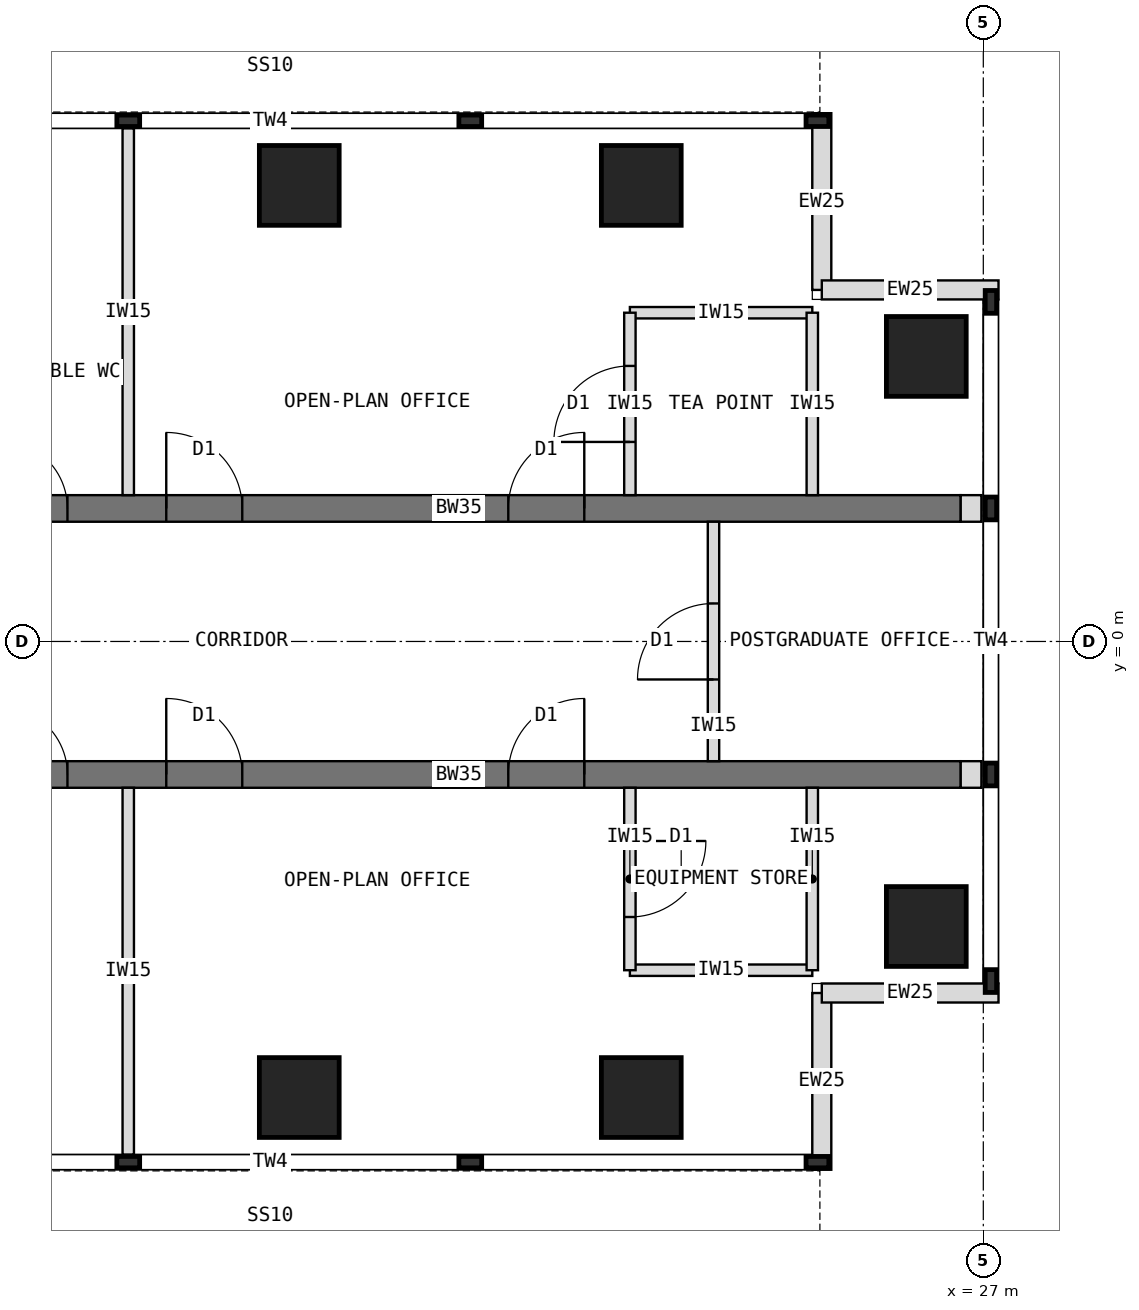
"""IFC4 building model, lengths in metres.
Left out: names, types, materials, properties, quantities, classifications, styles, units other than length and angle.
Written with IfcOpenShell. Run it as: python <this file> out.ifc"""

import sys

from ifc_helpers import new_model, si_unit, direction, frame, frame_2d, origin, origin_2d, place, context, subcontext, project, spatial, rectangle, extrude, element, fill, save


model = new_model("IFC4")
c1 = context("Model", 3, precision=1e-05, world=origin(), true_north=direction((0.0, 1.0)))
c2 = subcontext(c1, "Body", "Model", "MODEL_VIEW")
j1 = project(units=[si_unit("LENGTHUNIT", "METRE"), si_unit("PLANEANGLEUNIT", "RADIAN")], contexts=[c1])
p1 = place(None, origin())
s1 = spatial("IfcSite", under=j1, at=p1, CompositionType="ELEMENT")
p2 = place(p1, origin())
s2 = spatial("IfcBuilding", under=s1, at=p2, CompositionType="ELEMENT")
p3 = place(p2, frame((0.0, 0.0, 255.5)))
s3 = spatial("IfcBuildingStorey", under=s2, at=p3, CompositionType="ELEMENT", Elevation=255.5)
p4 = place(p3, frame((13.5, 1.75, 0.0), z_axis=(0.0, 0.0, 1.0), x_axis=(1.0, 0.0, 0.0)))
e1 = element("IfcWall", 1, at=p4, inside=s3, PredefinedType="SHEAR", context=c2, shape_type="SweptSolid", body=[
    extrude(rectangle(XDim=13.2, YDim=0.35, at=frame_2d((6.6, 0.0))), origin(), (0.0, 0.0, 1.0), 4.0),
])
p5 = place(p4, frame((0.55, 0.0, 0.0)))
e2 = element("IfcOpeningElement", 2, at=p5, cuts=e1, PredefinedType="OPENING", context=c2, shape_type="SweptSolid", body=[
    extrude(rectangle(XDim=0.9, YDim=2.1, at=frame_2d((0.45, 1.05))), frame((0.0, 0.185, 0.0), z_axis=(0.0, -1.0, 0.0), x_axis=(1.0, 0.0, 0.0)), (0.0, 0.0, 1.0), 0.37),
])
p6 = place(p4, frame((2.75, 0.0, 0.0)))
e3 = element("IfcOpeningElement", 3, at=p6, cuts=e1, PredefinedType="OPENING", context=c2, shape_type="SweptSolid", body=[
    extrude(rectangle(XDim=1.0, YDim=2.1, at=frame_2d((0.5, 1.05))), frame((0.0, 0.185, 0.0), z_axis=(0.0, -1.0, 0.0), x_axis=(1.0, 0.0, 0.0)), (0.0, 0.0, 1.0), 0.37),
])
p7 = place(p4, frame((7.25, 0.0, 0.0)))
e4 = element("IfcOpeningElement", 4, at=p7, cuts=e1, PredefinedType="OPENING", context=c2, shape_type="SweptSolid", body=[
    extrude(rectangle(XDim=1.0, YDim=2.1, at=frame_2d((0.5, 1.05))), frame((0.0, 0.185, 0.0), z_axis=(0.0, -1.0, 0.0), x_axis=(1.0, 0.0, 0.0)), (0.0, 0.0, 1.0), 0.37),
])
p8 = place(p3, frame((13.5, -1.75, 0.0), z_axis=(0.0, 0.0, 1.0), x_axis=(1.0, 0.0, 0.0)))
e5 = element("IfcWall", 5, at=p8, inside=s3, PredefinedType="SHEAR", context=c2, shape_type="SweptSolid", body=[
    extrude(rectangle(XDim=13.2, YDim=0.35, at=frame_2d((6.6, 0.0))), origin(), (0.0, 0.0, 1.0), 4.0),
])
p9 = place(p8, frame((0.55, 0.0, 0.0)))
e6 = element("IfcOpeningElement", 6, at=p9, cuts=e5, PredefinedType="OPENING", context=c2, shape_type="SweptSolid", body=[
    extrude(rectangle(XDim=0.9, YDim=2.1, at=frame_2d((0.45, 1.05))), frame((0.0, 0.185, 0.0), z_axis=(0.0, -1.0, 0.0), x_axis=(1.0, 0.0, 0.0)), (0.0, 0.0, 1.0), 0.37),
])
p10 = place(p8, frame((2.75, 0.0, 0.0)))
e7 = element("IfcOpeningElement", 7, at=p10, cuts=e5, PredefinedType="OPENING", context=c2, shape_type="SweptSolid", body=[
    extrude(rectangle(XDim=1.0, YDim=2.1, at=frame_2d((0.5, 1.05))), frame((0.0, 0.185, 0.0), z_axis=(0.0, -1.0, 0.0), x_axis=(1.0, 0.0, 0.0)), (0.0, 0.0, 1.0), 0.37),
])
p11 = place(p8, frame((7.25, 0.0, 0.0)))
e8 = element("IfcOpeningElement", 8, at=p11, cuts=e5, PredefinedType="OPENING", context=c2, shape_type="SweptSolid", body=[
    extrude(rectangle(XDim=1.0, YDim=2.1, at=frame_2d((0.5, 1.05))), frame((0.0, 0.185, 0.0), z_axis=(0.0, -1.0, 0.0), x_axis=(1.0, 0.0, 0.0)), (0.0, 0.0, 1.0), 0.37),
])
for number, where, z_axis, x_axis in (
    (9, (18.0, 6.0, 0.0), (0.0, 0.0, 1.0), (1.0, 0.0, 0.0)),
    (10, (18.0, -6.0, 0.0), (0.0, 0.0, 1.0), (1.0, 0.0, 0.0)),
    (11, (22.5, 6.0, 0.0), (0.0, 0.0, 1.0), (1.0, 0.0, 0.0)),
    (12, (22.5, -6.0, 0.0), (0.0, 0.0, 1.0), (1.0, 0.0, 0.0)),
    (13, (26.25, 3.75, 0.0), (0.0, 0.0, 1.0), (1.0, 0.0, 0.0)),
    (14, (26.25, -3.75, 0.0), (0.0, 0.0, 1.0), (1.0, 0.0, 0.0)),
):
    element("IfcColumn", number, at=place(p3, frame(where, z_axis=z_axis, x_axis=x_axis)), inside=s3, PredefinedType="COLUMN", context=c2, shape_type="SweptSolid", body=[
        extrude(rectangle(XDim=1.05, YDim=1.05, at=origin_2d()), origin(), (0.0, 0.0, 1.0), 4.0),
    ])
for number, where, z_axis, x_axis in (
    (15, (24.875, 6.95, 0.0), (0.0, 0.0, 1.0), (0.0, -1.0, 0.0)),
    (16, (24.875, 4.625, 0.0), (0.0, 0.0, 1.0), (1.0, 0.0, 0.0)),
    (17, (24.875, -6.95, 0.0), (0.0, 0.0, 1.0), (0.0, 1.0, 0.0)),
    (18, (24.875, -4.625, 0.0), (0.0, 0.0, 1.0), (1.0, 0.0, 0.0)),
):
    element("IfcWall", number, at=place(p3, frame(where, z_axis=z_axis, x_axis=x_axis)), inside=s3, PredefinedType="STANDARD", context=c2, shape_type="SweptSolid", body=[
        extrude(rectangle(XDim=2.325, YDim=0.25, at=frame_2d((1.163, 0.0))), origin(), (0.0, 0.0, 1.0), 3.8),
    ])
for number, where, z_axis, x_axis in (
    (19, (26.7, 1.75, 0.0), (0.0, 0.0, 1.0), (1.0, 0.0, 0.0)),
    (20, (26.7, -1.75, 0.0), (0.0, 0.0, 1.0), (1.0, 0.0, 0.0)),
):
    element("IfcWall", number, at=place(p3, frame(where, z_axis=z_axis, x_axis=x_axis)), inside=s3, PredefinedType="PARTITIONING", context=c2, shape_type="SweptSolid", body=[
        extrude(rectangle(XDim=0.275, YDim=0.35, at=frame_2d((0.138, 0.0))), origin(), (0.0, 0.0, 1.0), 3.8),
    ])
p12 = place(p3, frame((15.75, 1.925, 0.0), z_axis=(0.0, 0.0, 1.0), x_axis=(0.0, 1.0, 0.0)))
e21 = element("IfcWall", 21, at=p12, inside=s3, PredefinedType="PARTITIONING", context=c2, shape_type="SweptSolid", body=[
    extrude(rectangle(XDim=4.825, YDim=0.15, at=frame_2d((2.413, 0.0))), origin(), (0.0, 0.0, 1.0), 3.8),
])
p13 = place(p3, frame((22.35, 4.325, 0.0), z_axis=(0.0, 0.0, 1.0), x_axis=(1.0, 0.0, 0.0)))
e22 = element("IfcWall", 22, at=p13, inside=s3, PredefinedType="PARTITIONING", context=c2, shape_type="SweptSolid", body=[
    extrude(rectangle(XDim=2.4, YDim=0.15, at=frame_2d((1.2, 0.0))), origin(), (0.0, 0.0, 1.0), 3.8),
])
p14 = place(p3, frame((22.35, 1.925, 0.0), z_axis=(0.0, 0.0, 1.0), x_axis=(0.0, 1.0, 0.0)))
e23 = element("IfcWall", 23, at=p14, inside=s3, PredefinedType="PARTITIONING", context=c2, shape_type="SweptSolid", body=[
    extrude(rectangle(XDim=2.4, YDim=0.15, at=frame_2d((1.2, 0.0))), origin(), (0.0, 0.0, 1.0), 3.8),
])
p15 = place(p14, frame((0.7, 0.0, 0.0)))
e24 = element("IfcOpeningElement", 24, at=p15, cuts=e23, PredefinedType="OPENING", context=c2, shape_type="SweptSolid", body=[
    extrude(rectangle(XDim=1.0, YDim=2.1, at=frame_2d((0.5, 1.05))), frame((0.0, 0.085, 0.0), z_axis=(0.0, -1.0, 0.0), x_axis=(1.0, 0.0, 0.0)), (0.0, 0.0, 1.0), 0.17),
])
p16 = place(p3, frame((24.75, 1.925, 0.0), z_axis=(0.0, 0.0, 1.0), x_axis=(0.0, 1.0, 0.0)))
e25 = element("IfcWall", 25, at=p16, inside=s3, PredefinedType="PARTITIONING", context=c2, shape_type="SweptSolid", body=[
    extrude(rectangle(XDim=2.4, YDim=0.15, at=frame_2d((1.2, 0.0))), origin(), (0.0, 0.0, 1.0), 3.8),
])
p17 = place(p3, frame((15.75, -1.925, 0.0), z_axis=(0.0, 0.0, 1.0), x_axis=(0.0, -1.0, 0.0)))
e26 = element("IfcWall", 26, at=p17, inside=s3, PredefinedType="PARTITIONING", context=c2, shape_type="SweptSolid", body=[
    extrude(rectangle(XDim=4.825, YDim=0.15, at=frame_2d((2.413, 0.0))), origin(), (0.0, 0.0, 1.0), 3.8),
])
p18 = place(p3, frame((22.35, -4.325, 0.0), z_axis=(0.0, 0.0, 1.0), x_axis=(1.0, 0.0, 0.0)))
e27 = element("IfcWall", 27, at=p18, inside=s3, PredefinedType="PARTITIONING", context=c2, shape_type="SweptSolid", body=[
    extrude(rectangle(XDim=2.4, YDim=0.15, at=frame_2d((1.2, 0.0))), origin(), (0.0, 0.0, 1.0), 3.8),
])
p19 = place(p3, frame((22.35, -1.925, 0.0), z_axis=(0.0, 0.0, 1.0), x_axis=(0.0, -1.0, 0.0)))
e28 = element("IfcWall", 28, at=p19, inside=s3, PredefinedType="PARTITIONING", context=c2, shape_type="SweptSolid", body=[
    extrude(rectangle(XDim=2.4, YDim=0.15, at=frame_2d((1.2, 0.0))), origin(), (0.0, 0.0, 1.0), 3.8),
])
p20 = place(p19, frame((0.7, 0.0, 0.0)))
e29 = element("IfcOpeningElement", 29, at=p20, cuts=e28, PredefinedType="OPENING", context=c2, shape_type="SweptSolid", body=[
    extrude(rectangle(XDim=1.0, YDim=2.1, at=frame_2d((0.5, 1.05))), frame((0.0, 0.085, 0.0), z_axis=(0.0, -1.0, 0.0), x_axis=(1.0, 0.0, 0.0)), (0.0, 0.0, 1.0), 0.17),
])
p21 = place(p3, frame((24.75, -1.925, 0.0), z_axis=(0.0, 0.0, 1.0), x_axis=(0.0, -1.0, 0.0)))
e30 = element("IfcWall", 30, at=p21, inside=s3, PredefinedType="PARTITIONING", context=c2, shape_type="SweptSolid", body=[
    extrude(rectangle(XDim=2.4, YDim=0.15, at=frame_2d((1.2, 0.0))), origin(), (0.0, 0.0, 1.0), 3.8),
])
p22 = place(p3, frame((23.45, -1.575, 0.0), z_axis=(0.0, 0.0, 1.0), x_axis=(0.0, 1.0, 0.0)))
e31 = element("IfcWall", 31, at=p22, inside=s3, PredefinedType="PARTITIONING", context=c2, shape_type="SweptSolid", body=[
    extrude(rectangle(XDim=3.15, YDim=0.15, at=frame_2d((1.575, 0.0))), origin(), (0.0, 0.0, 1.0), 3.8),
])
p23 = place(p22, frame((1.075, 0.0, 0.0)))
e32 = element("IfcOpeningElement", 32, at=p23, cuts=e31, PredefinedType="OPENING", context=c2, shape_type="SweptSolid", body=[
    extrude(rectangle(XDim=1.0, YDim=2.1, at=frame_2d((0.5, 1.05))), frame((0.0, 0.085, 0.0), z_axis=(0.0, -1.0, 0.0), x_axis=(1.0, 0.0, 0.0)), (0.0, 0.0, 1.0), 0.17),
])
p24 = place(p15, origin())
e33 = element("IfcDoor", 33, at=p24, inside=s3, OperationType="SINGLE_SWING_LEFT", PredefinedType="DOOR", context=c2, shape_type="SweptSolid", body=[
    extrude(rectangle(XDim=1.0, YDim=2.1, at=frame_2d((0.5, 1.05))), frame((0.0, 0.025, 0.0), z_axis=(0.0, -1.0, 0.0), x_axis=(1.0, 0.0, 0.0)), (0.0, 0.0, 1.0), 0.05),
])
fill(e24, e33)
p25 = place(p20, origin())
e34 = element("IfcDoor", 34, at=p25, inside=s3, OperationType="SINGLE_SWING_LEFT", PredefinedType="DOOR", context=c2, shape_type="SweptSolid", body=[
    extrude(rectangle(XDim=1.0, YDim=2.1, at=frame_2d((0.5, 1.05))), frame((0.0, 0.025, 0.0), z_axis=(0.0, -1.0, 0.0), x_axis=(1.0, 0.0, 0.0)), (0.0, 0.0, 1.0), 0.05),
])
fill(e29, e34)
p26 = place(p23, origin())
e35 = element("IfcDoor", 35, at=p26, inside=s3, OperationType="SINGLE_SWING_LEFT", PredefinedType="DOOR", context=c2, shape_type="SweptSolid", body=[
    extrude(rectangle(XDim=1.0, YDim=2.1, at=frame_2d((0.5, 1.05))), frame((0.0, 0.025, 0.0), z_axis=(0.0, -1.0, 0.0), x_axis=(1.0, 0.0, 0.0)), (0.0, 0.0, 1.0), 0.05),
])
fill(e32, e35)
p27 = place(p5, origin())
e36 = element("IfcDoor", 36, at=p27, inside=s3, OperationType="SINGLE_SWING_LEFT", PredefinedType="DOOR", context=c2, shape_type="SweptSolid", body=[
    extrude(rectangle(XDim=0.9, YDim=2.1, at=frame_2d((0.45, 1.05))), frame((0.0, 0.025, 0.0), z_axis=(0.0, -1.0, 0.0), x_axis=(1.0, 0.0, 0.0)), (0.0, 0.0, 1.0), 0.05),
])
fill(e2, e36)
p28 = place(p6, origin())
e37 = element("IfcDoor", 37, at=p28, inside=s3, OperationType="SINGLE_SWING_LEFT", PredefinedType="DOOR", context=c2, shape_type="SweptSolid", body=[
    extrude(rectangle(XDim=1.0, YDim=2.1, at=frame_2d((0.5, 1.05))), frame((0.0, 0.025, 0.0), z_axis=(0.0, -1.0, 0.0), x_axis=(1.0, 0.0, 0.0)), (0.0, 0.0, 1.0), 0.05),
])
fill(e3, e37)
p29 = place(p7, origin())
e38 = element("IfcDoor", 38, at=p29, inside=s3, OperationType="SINGLE_SWING_RIGHT", PredefinedType="DOOR", context=c2, shape_type="SweptSolid", body=[
    extrude(rectangle(XDim=1.0, YDim=2.1, at=frame_2d((0.5, 1.05))), frame((0.0, 0.025, 0.0), z_axis=(0.0, -1.0, 0.0), x_axis=(1.0, 0.0, 0.0)), (0.0, 0.0, 1.0), 0.05),
])
fill(e4, e38)
p30 = place(p9, origin())
e39 = element("IfcDoor", 39, at=p30, inside=s3, OperationType="SINGLE_SWING_LEFT", PredefinedType="DOOR", context=c2, shape_type="SweptSolid", body=[
    extrude(rectangle(XDim=0.9, YDim=2.1, at=frame_2d((0.45, 1.05))), frame((0.0, 0.025, 0.0), z_axis=(0.0, -1.0, 0.0), x_axis=(1.0, 0.0, 0.0)), (0.0, 0.0, 1.0), 0.05),
])
fill(e6, e39)
p31 = place(p10, origin())
e40 = element("IfcDoor", 40, at=p31, inside=s3, OperationType="SINGLE_SWING_LEFT", PredefinedType="DOOR", context=c2, shape_type="SweptSolid", body=[
    extrude(rectangle(XDim=1.0, YDim=2.1, at=frame_2d((0.5, 1.05))), frame((0.0, 0.025, 0.0), z_axis=(0.0, -1.0, 0.0), x_axis=(1.0, 0.0, 0.0)), (0.0, 0.0, 1.0), 0.05),
])
fill(e7, e40)
p32 = place(p11, origin())
e41 = element("IfcDoor", 41, at=p32, inside=s3, OperationType="SINGLE_SWING_RIGHT", PredefinedType="DOOR", context=c2, shape_type="SweptSolid", body=[
    extrude(rectangle(XDim=1.0, YDim=2.1, at=frame_2d((0.5, 1.05))), frame((0.0, 0.025, 0.0), z_axis=(0.0, -1.0, 0.0), x_axis=(1.0, 0.0, 0.0)), (0.0, 0.0, 1.0), 0.05),
])
fill(e8, e41)
save(model, sys.argv[1])
